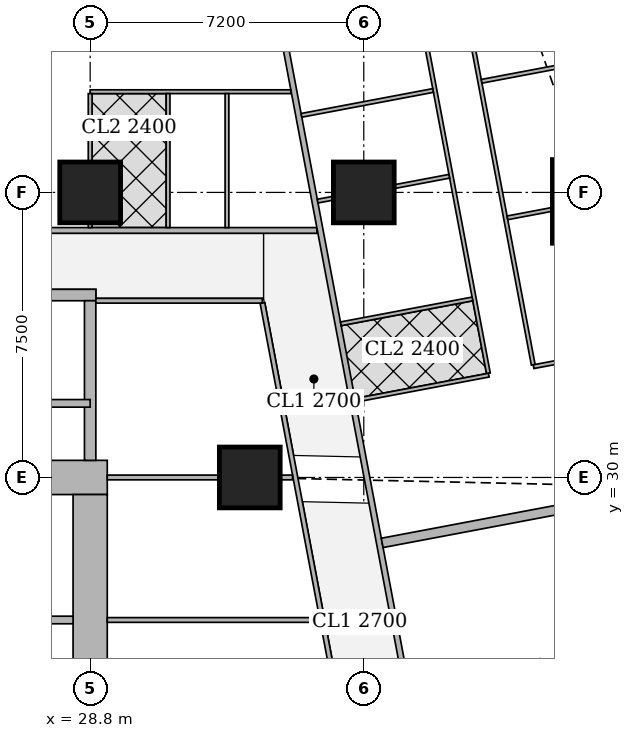
"""IFC4 building model, lengths in metres.
Left out: names, types, materials, properties, quantities, classifications, styles, units other than length and angle.
Written with IfcOpenShell. Run it as: python <this file> out.ifc"""

import sys

from ifc_helpers import new_model, si_unit, direction, frame, frame_2d, origin, origin_2d, place, context, subcontext, project, spatial, rectangle, extrude, element, fill, save


model = new_model("IFC4")
c1 = context("Model", 3, precision=1e-05, world=origin(), true_north=direction((0.0, 1.0)))
c2 = subcontext(c1, "Body", "Model", "MODEL_VIEW")
j1 = project(units=[si_unit("LENGTHUNIT", "METRE"), si_unit("PLANEANGLEUNIT", "RADIAN")], contexts=[c1])
p1 = place(None, origin())
s1 = spatial("IfcSite", under=j1, at=p1, CompositionType="ELEMENT")
p2 = place(p1, origin())
s2 = spatial("IfcBuilding", under=s1, at=p2, CompositionType="ELEMENT")
p3 = place(p2, frame((0.0, 0.0, 89.15)))
s3 = spatial("IfcBuildingStorey", under=s2, at=p3, CompositionType="ELEMENT", Elevation=89.15)
for number, where, z_axis, x_axis in (
    (1, (33.0, 30.0, 0.0), (0.0, 0.0, 1.0), (1.0, 0.0, 0.0)),
    (2, (28.8, 37.5, 0.0), (0.0, 0.0, 1.0), (1.0, 0.0, 0.0)),
    (3, (36.0, 37.5, 0.0), (0.0, 0.0, 1.0), (1.0, 0.0, 0.0)),
):
    element("IfcColumn", number, at=place(p3, frame(where, z_axis=z_axis, x_axis=x_axis)), inside=s3, PredefinedType="COLUMN", context=c2, shape_type="SweptSolid", body=[
        extrude(rectangle(XDim=1.6, YDim=1.6, at=origin_2d()), origin(), (0.0, 0.0, 1.0), 3.75),
    ])
p4 = place(p3, frame((42.064, 37.263, 0.0), z_axis=(0.0, 0.0, 1.0), x_axis=(1.0, 0.0, 0.0)))
e4 = element("IfcColumn", 4, at=p4, inside=s3, PredefinedType="COLUMN", context=c2, shape_type="SweptSolid", body=[
    extrude(rectangle(XDim=2.2, YDim=2.2, at=origin_2d()), origin(), (0.0, 0.0, 1.0), 3.75),
])
p5 = place(p3, frame((13.95, 30.0, 0.0), z_axis=(0.0, 0.0, 1.0), x_axis=(1.0, 0.0, 0.0)))
e5 = element("IfcWall", 5, at=p5, inside=s3, PredefinedType="SHEAR", context=c2, shape_type="SweptSolid", body=[
    extrude(rectangle(XDim=15.3, YDim=0.9, at=frame_2d((7.65, 0.0))), origin(), (0.0, 0.0, 1.0), 3.75),
])
p6 = place(p5, frame((4.45, 0.0, 0.0)))
e6 = element("IfcOpeningElement", 6, at=p6, cuts=e5, PredefinedType="OPENING", context=c2, shape_type="SweptSolid", body=[
    extrude(rectangle(XDim=1.8, YDim=2.1, at=frame_2d((0.9, 1.05))), frame((0.0, 0.46, 0.0), z_axis=(0.0, -1.0, 0.0), x_axis=(1.0, 0.0, 0.0)), (0.0, 0.0, 1.0), 0.92),
])
p7 = place(p5, frame((10.7, 0.0, 0.0)))
e7 = element("IfcOpeningElement", 7, at=p7, cuts=e5, PredefinedType="OPENING", context=c2, shape_type="SweptSolid", body=[
    extrude(rectangle(XDim=1.1, YDim=2.1, at=frame_2d((0.55, 1.05))), frame((0.0, 0.46, 0.0), z_axis=(0.0, -1.0, 0.0), x_axis=(1.0, 0.0, 0.0)), (0.0, 0.0, 1.0), 0.92),
])
p8 = place(p3, frame((28.8, 15.45, 0.0), z_axis=(0.0, 0.0, 1.0), x_axis=(0.0, 1.0, 0.0)))
e8 = element("IfcWall", 8, at=p8, inside=s3, PredefinedType="SHEAR", context=c2, shape_type="SweptSolid", body=[
    extrude(rectangle(XDim=14.1, YDim=0.9, at=frame_2d((7.05, 0.0))), origin(), (0.0, 0.0, 1.0), 3.75),
])
p9 = place(p3, frame((21.45, 34.8, 0.0), z_axis=(0.0, 0.0, 1.0), x_axis=(1.0, 0.0, 0.0)))
e9 = element("IfcWall", 9, at=p9, inside=s3, PredefinedType="SHEAR", context=c2, shape_type="SweptSolid", body=[
    extrude(rectangle(XDim=7.5, YDim=0.3, at=frame_2d((3.75, 0.0))), origin(), (0.0, 0.0, 1.0), 3.75),
])
p10 = place(p9, frame((0.5, 0.0, 0.0)))
e10 = element("IfcOpeningElement", 10, at=p10, cuts=e9, PredefinedType="OPENING", context=c2, shape_type="SweptSolid", body=[
    extrude(rectangle(XDim=1.1, YDim=2.1, at=frame_2d((0.55, 1.05))), frame((0.0, 0.16, 0.0), z_axis=(0.0, -1.0, 0.0), x_axis=(1.0, 0.0, 0.0)), (0.0, 0.0, 1.0), 0.32),
])
p11 = place(p3, frame((28.8, 30.45, 0.0), z_axis=(0.0, 0.0, 1.0), x_axis=(0.0, 1.0, 0.0)))
e11 = element("IfcWall", 11, at=p11, inside=s3, PredefinedType="SHEAR", context=c2, shape_type="SweptSolid", body=[
    extrude(rectangle(XDim=4.2, YDim=0.3, at=frame_2d((2.1, 0.0))), origin(), (0.0, 0.0, 1.0), 3.75),
])
p12 = place(p3, frame((8.35, 36.5, 0.0), z_axis=(0.0, 0.0, 1.0), x_axis=(1.0, 0.0, 0.0)))
e12 = element("IfcWall", 12, at=p12, inside=s3, PredefinedType="SOLIDWALL", context=c2, shape_type="SweptSolid", body=[
    extrude(rectangle(XDim=26.415, YDim=0.15, at=frame_2d((13.208, 0.0))), origin(), (0.0, 0.0, 1.0), 3.5),
])
p13 = place(p12, frame((2.6, 0.0, 0.0)))
e13 = element("IfcOpeningElement", 13, at=p13, cuts=e12, PredefinedType="OPENING", context=c2, shape_type="SweptSolid", body=[
    extrude(rectangle(XDim=1.0, YDim=2.1, at=frame_2d((0.5, 1.05))), frame((0.0, 0.085, 0.0), z_axis=(0.0, -1.0, 0.0), x_axis=(1.0, 0.0, 0.0)), (0.0, 0.0, 1.0), 0.17),
])
p14 = place(p12, frame((10.75, 0.0, 0.0)))
e14 = element("IfcOpeningElement", 14, at=p14, cuts=e12, PredefinedType="OPENING", context=c2, shape_type="SweptSolid", body=[
    extrude(rectangle(XDim=1.0, YDim=2.1, at=frame_2d((0.5, 1.05))), frame((0.0, 0.085, 0.0), z_axis=(0.0, -1.0, 0.0), x_axis=(1.0, 0.0, 0.0)), (0.0, 0.0, 1.0), 0.17),
])
p15 = place(p12, frame((18.007, 0.0, 0.0)))
e15 = element("IfcOpeningElement", 15, at=p15, cuts=e12, PredefinedType="OPENING", context=c2, shape_type="SweptSolid", body=[
    extrude(rectangle(XDim=1.0, YDim=2.1, at=frame_2d((0.5, 1.05))), frame((0.0, 0.085, 0.0), z_axis=(0.0, -1.0, 0.0), x_axis=(1.0, 0.0, 0.0)), (0.0, 0.0, 1.0), 0.17),
])
p16 = place(p3, frame((33.127, 45.65, 0.0), z_axis=(0.0, 0.0, 1.0), x_axis=(0.185598547723, -0.98262565562, 0.0)))
e16 = element("IfcWall", 16, at=p16, inside=s3, PredefinedType="SOLIDWALL", context=c2, shape_type="SweptSolid", body=[
    extrude(rectangle(XDim=47.118, YDim=0.15, at=frame_2d((23.559, 0.0))), origin(), (0.0, 0.0, 1.0), 2.2),
])
p17 = place(p16, frame((15.285, 0.0, 0.0)))
e17 = element("IfcOpeningElement", 17, at=p17, cuts=e16, PredefinedType="OPENING", context=c2, shape_type="SweptSolid", body=[
    extrude(rectangle(XDim=1.0, YDim=2.1, at=frame_2d((0.5, 1.05))), frame((0.0, 0.085, 0.0), z_axis=(0.0, -1.0, 0.0), x_axis=(1.0, 0.0, 0.0)), (0.0, 0.0, 1.0), 0.17),
])
p18 = place(p16, frame((19.102, 0.0, 0.0)))
e18 = element("IfcOpeningElement", 18, at=p18, cuts=e16, PredefinedType="OPENING", context=c2, shape_type="SweptSolid", body=[
    extrude(rectangle(XDim=1.0, YDim=2.1, at=frame_2d((0.5, 1.05))), frame((0.0, 0.085, 0.0), z_axis=(0.0, -1.0, 0.0), x_axis=(1.0, 0.0, 0.0)), (0.0, 0.0, 1.0), 0.17),
])
p19 = place(p16, frame((33.88, 0.0, 0.0)))
e19 = element("IfcOpeningElement", 19, at=p19, cuts=e16, PredefinedType="OPENING", context=c2, shape_type="SweptSolid", body=[
    extrude(rectangle(XDim=1.0, YDim=2.1, at=frame_2d((0.5, 1.05))), frame((0.0, 0.085, 0.0), z_axis=(0.0, -1.0, 0.0), x_axis=(1.0, 0.0, 0.0)), (0.0, 0.0, 1.0), 0.17),
])
p20 = place(p3, frame((38.862, 41.42, 0.0), z_axis=(0.0, 0.0, 1.0), x_axis=(0.185574815416, -0.982630137887, 0.0)))
e20 = element("IfcWall", 20, at=p20, inside=s3, PredefinedType="PARTITIONING", context=c2, shape_type="SweptSolid", body=[
    extrude(rectangle(XDim=8.605, YDim=0.1, at=frame_2d((4.303, 0.0))), origin(), (0.0, 0.0, 1.0), 3.5),
])
p21 = place(p20, frame((7.555, 0.0, 0.0)))
e21 = element("IfcOpeningElement", 21, at=p21, cuts=e20, PredefinedType="OPENING", context=c2, shape_type="SweptSolid", body=[
    extrude(rectangle(XDim=0.9, YDim=2.1, at=frame_2d((0.45, 1.05))), frame((0.0, 0.06, 0.0), z_axis=(0.0, -1.0, 0.0), x_axis=(1.0, 0.0, 0.0)), (0.0, 0.0, 1.0), 0.12),
])
p22 = place(p20, frame((3.579, 0.0, 0.0)))
e22 = element("IfcOpeningElement", 22, at=p22, cuts=e20, PredefinedType="OPENING", context=c2, shape_type="SweptSolid", body=[
    extrude(rectangle(XDim=0.9, YDim=2.1, at=frame_2d((0.45, 1.05))), frame((0.0, 0.06, 0.0), z_axis=(0.0, -1.0, 0.0), x_axis=(1.0, 0.0, 0.0)), (0.0, 0.0, 1.0), 0.12),
])
p23 = place(p3, frame((37.473, 42.309, 0.0), z_axis=(0.0, 0.0, 1.0), x_axis=(0.185491912953, -0.982645790827, 0.0)))
e23 = element("IfcWall", 23, at=p23, inside=s3, PredefinedType="PARTITIONING", context=c2, shape_type="SweptSolid", body=[
    extrude(rectangle(XDim=9.737, YDim=0.1, at=frame_2d((4.869, 0.0))), origin(), (0.0, 0.0, 1.0), 3.5),
])
p24 = place(p23, frame((8.312, 0.0, 0.0)))
e24 = element("IfcOpeningElement", 24, at=p24, cuts=e23, PredefinedType="OPENING", context=c2, shape_type="SweptSolid", body=[
    extrude(rectangle(XDim=0.9, YDim=2.1, at=frame_2d((0.45, 1.05))), frame((0.0, 0.06, 0.0), z_axis=(0.0, -1.0, 0.0), x_axis=(1.0, 0.0, 0.0)), (0.0, 0.0, 1.0), 0.12),
])
p25 = place(p23, frame((2.853, 0.0, 0.0)))
e25 = element("IfcOpeningElement", 25, at=p25, cuts=e23, PredefinedType="OPENING", context=c2, shape_type="SweptSolid", body=[
    extrude(rectangle(XDim=0.9, YDim=2.1, at=frame_2d((0.45, 1.05))), frame((0.0, 0.06, 0.0), z_axis=(0.0, -1.0, 0.0), x_axis=(1.0, 0.0, 0.0)), (0.0, 0.0, 1.0), 0.12),
])
p26 = place(p23, frame((5.644, 0.0, 0.0)))
e26 = element("IfcOpeningElement", 26, at=p26, cuts=e23, PredefinedType="OPENING", context=c2, shape_type="SweptSolid", body=[
    extrude(rectangle(XDim=0.9, YDim=2.1, at=frame_2d((0.45, 1.05))), frame((0.0, 0.06, 0.0), z_axis=(0.0, -1.0, 0.0), x_axis=(1.0, 0.0, 0.0)), (0.0, 0.0, 1.0), 0.12),
])
p27 = place(p3, frame((43.277, 41.212, 0.0), z_axis=(0.0, 0.0, 1.0), x_axis=(-0.982665405803, -0.185387972203, 0.0)))
e27 = element("IfcWall", 27, at=p27, inside=s3, PredefinedType="PARTITIONING", context=c2, shape_type="SweptSolid", body=[
    extrude(rectangle(XDim=4.25, YDim=0.1, at=frame_2d((2.125, 0.0))), origin(), (0.0, 0.0, 1.0), 2.05),
])
p28 = place(p3, frame((40.954, 37.053, 0.0), z_axis=(0.0, 0.0, 1.0), x_axis=(-0.982628652346, -0.185582681276, 0.0)))
e28 = element("IfcWall", 28, at=p28, inside=s3, PredefinedType="PARTITIONING", context=c2, shape_type="SweptSolid", body=[
    extrude(rectangle(XDim=1.196, YDim=0.1, at=frame_2d((0.598, 0.0))), origin(), (0.0, 0.0, 1.0), 2.05),
])
p29 = place(p3, frame((44.693, 33.713, 0.0), z_axis=(0.0, 0.0, 1.0), x_axis=(-0.982633535512, -0.185556823879, 0.0)))
e29 = element("IfcWall", 29, at=p29, inside=s3, PredefinedType="PARTITIONING", context=c2, shape_type="SweptSolid", body=[
    extrude(rectangle(XDim=4.3, YDim=0.1, at=frame_2d((2.15, 0.0))), origin(), (0.0, 0.0, 1.0), 2.2),
])
p30 = place(p3, frame((37.823, 40.182, 0.0), z_axis=(0.0, 0.0, 1.0), x_axis=(-0.98263926043, -0.185526504472, 0.0)))
e30 = element("IfcWall", 30, at=p30, inside=s3, PredefinedType="PARTITIONING", context=c2, shape_type="SweptSolid", body=[
    extrude(rectangle(XDim=3.524, YDim=0.1, at=frame_2d((1.762, 0.0))), origin(), (0.0, 0.0, 1.0), 3.5),
])
p31 = place(p3, frame((38.25, 37.925, 0.0), z_axis=(0.0, 0.0, 1.0), x_axis=(-0.982626127294, -0.185596050493, 0.0)))
e31 = element("IfcWall", 31, at=p31, inside=s3, PredefinedType="PARTITIONING", context=c2, shape_type="SweptSolid", body=[
    extrude(rectangle(XDim=1.465, YDim=0.1, at=frame_2d((0.733, 0.0))), origin(), (0.0, 0.0, 1.0), 3.5),
])
p32 = place(p3, frame((35.19, 37.347, 0.0), z_axis=(0.0, 0.0, 1.0), x_axis=(-0.982798158448, -0.184682916784, 0.0)))
e32 = element("IfcWall", 32, at=p32, inside=s3, PredefinedType="PARTITIONING", context=c2, shape_type="SweptSolid", body=[
    extrude(rectangle(XDim=0.411, YDim=0.1, at=frame_2d((0.206, 0.0))), origin(), (0.0, 0.0, 1.0), 3.5),
])
p33 = place(p3, frame((39.289, 32.692, 0.0), z_axis=(0.0, 0.0, 1.0), x_axis=(-0.982662827464, -0.185401638399, 0.0)))
e33 = element("IfcWall", 33, at=p33, inside=s3, PredefinedType="PARTITIONING", context=c2, shape_type="SweptSolid", body=[
    extrude(rectangle(XDim=3.575, YDim=0.1, at=frame_2d((1.788, 0.0))), origin(), (0.0, 0.0, 1.0), 3.5),
])
p34 = place(p3, frame((38.859, 34.697, 0.0), z_axis=(0.0, 0.0, 1.0), x_axis=(-0.982626628545, -0.185593396635, 0.0)))
e34 = element("IfcWall", 34, at=p34, inside=s3, PredefinedType="PARTITIONING", context=c2, shape_type="SweptSolid", body=[
    extrude(rectangle(XDim=3.524, YDim=0.1, at=frame_2d((1.762, 0.0))), origin(), (0.0, 0.0, 1.0), 3.5),
])
p35 = place(p3, frame((41.177, 29.164, 0.0), z_axis=(0.0, 0.0, 1.0), x_axis=(-0.982642846239, -0.185507511263, 0.0)))
e35 = element("IfcWall", 35, at=p35, inside=s3, PredefinedType="SOLIDWALL", context=c2, shape_type="SweptSolid", body=[
    extrude(rectangle(XDim=4.776, YDim=0.25, at=frame_2d((2.388, 0.0))), origin(), (0.0, 0.0, 1.0), 2.5),
])
p36 = place(p3, frame((28.8, 40.15, 0.0), z_axis=(0.0, 0.0, 1.0), x_axis=(1.0, 0.0, 0.0)))
e36 = element("IfcWall", 36, at=p36, inside=s3, PredefinedType="PARTITIONING", context=c2, shape_type="SweptSolid", body=[
    extrude(rectangle(XDim=5.28, YDim=0.1, at=frame_2d((2.64, 0.0))), origin(), (0.0, 0.0, 1.0), 3.5),
])
p37 = place(p36, frame((0.575, 0.0, 0.0)))
e37 = element("IfcOpeningElement", 37, at=p37, cuts=e36, PredefinedType="OPENING", context=c2, shape_type="SweptSolid", body=[
    extrude(rectangle(XDim=0.9, YDim=2.1, at=frame_2d((0.45, 1.05))), frame((0.0, 0.06, 0.0), z_axis=(0.0, -1.0, 0.0), x_axis=(1.0, 0.0, 0.0)), (0.0, 0.0, 1.0), 0.12),
])
p38 = place(p36, frame((4.23, 0.0, 0.0)))
e38 = element("IfcOpeningElement", 38, at=p38, cuts=e36, PredefinedType="OPENING", context=c2, shape_type="SweptSolid", body=[
    extrude(rectangle(XDim=0.9, YDim=2.1, at=frame_2d((0.45, 1.05))), frame((0.0, 0.06, 0.0), z_axis=(0.0, -1.0, 0.0), x_axis=(1.0, 0.0, 0.0)), (0.0, 0.0, 1.0), 0.12),
])
p39 = place(p36, frame((2.375, 0.0, 0.0)))
e39 = element("IfcOpeningElement", 39, at=p39, cuts=e36, PredefinedType="OPENING", context=c2, shape_type="SweptSolid", body=[
    extrude(rectangle(XDim=0.9, YDim=2.1, at=frame_2d((0.45, 1.05))), frame((0.0, 0.06, 0.0), z_axis=(0.0, -1.0, 0.0), x_axis=(1.0, 0.0, 0.0)), (0.0, 0.0, 1.0), 0.12),
])
p40 = place(p3, frame((28.8, 36.575, 0.0), z_axis=(0.0, 0.0, 1.0), x_axis=(0.0, 1.0, 0.0)))
e40 = element("IfcWall", 40, at=p40, inside=s3, PredefinedType="PARTITIONING", context=c2, shape_type="SweptSolid", body=[
    extrude(rectangle(XDim=0.124, YDim=0.1, at=frame_2d((0.062, 0.0))), origin(), (0.0, 0.0, 1.0), 3.5),
])
p41 = place(p3, frame((28.8, 38.301, 0.0), z_axis=(0.0, 0.0, 1.0), x_axis=(0.0, 1.0, 0.0)))
e41 = element("IfcWall", 41, at=p41, inside=s3, PredefinedType="PARTITIONING", context=c2, shape_type="SweptSolid", body=[
    extrude(rectangle(XDim=1.799, YDim=0.1, at=frame_2d((0.899, 0.0))), origin(), (0.0, 0.0, 1.0), 3.5),
])
for number, where, z_axis, x_axis in (
    (42, (32.4, 36.575, 0.0), (0.0, 0.0, 1.0), (0.0, 1.0, 0.0)),
    (43, (30.85, 36.575, 0.0), (0.0, 0.0, 1.0), (0.0, 1.0, 0.0)),
):
    element("IfcWall", number, at=place(p3, frame(where, z_axis=z_axis, x_axis=x_axis)), inside=s3, PredefinedType="PARTITIONING", context=c2, shape_type="SweptSolid", body=[
        extrude(rectangle(XDim=3.525, YDim=0.1, at=frame_2d((1.763, 0.0))), origin(), (0.0, 0.0, 1.0), 3.5),
    ])
p42 = place(p3, frame((28.95, 34.65, 0.0), z_axis=(0.0, 0.0, 1.0), x_axis=(1.0, 0.0, 0.0)))
e44 = element("IfcWall", 44, at=p42, inside=s3, PredefinedType="PARTITIONING", context=c2, shape_type="SweptSolid", body=[
    extrude(rectangle(XDim=4.381, YDim=0.125, at=frame_2d((2.19, 0.0))), origin(), (0.0, 0.0, 1.0), 3.5),
])
p43 = place(p3, frame((37.9, 10.413, 0.0), z_axis=(0.0, 0.0, 1.0), x_axis=(-0.185589740669, 0.982627319058, 0.0)))
e45 = element("IfcWall", 45, at=p43, inside=s3, PredefinedType="PARTITIONING", context=c2, shape_type="SweptSolid", body=[
    extrude(rectangle(XDim=24.602, YDim=0.125, at=frame_2d((12.301, 0.0))), origin(), (0.0, 0.0, 1.0), 2.5),
])
p44 = place(p43, frame((0.708, 0.0, 0.0)))
e46 = element("IfcOpeningElement", 46, at=p44, cuts=e45, PredefinedType="OPENING", context=c2, shape_type="SweptSolid", body=[
    extrude(rectangle(XDim=1.0, YDim=2.1, at=frame_2d((0.5, 1.05))), frame((0.0, 0.073, 0.0), z_axis=(0.0, -1.0, 0.0), x_axis=(1.0, 0.0, 0.0)), (0.0, 0.0, 1.0), 0.145),
])
p45 = place(p43, frame((5.75, 0.0, 0.0)))
e47 = element("IfcOpeningElement", 47, at=p45, cuts=e45, PredefinedType="OPENING", context=c2, shape_type="SweptSolid", body=[
    extrude(rectangle(XDim=1.0, YDim=2.1, at=frame_2d((0.5, 1.05))), frame((0.0, 0.073, 0.0), z_axis=(0.0, -1.0, 0.0), x_axis=(1.0, 0.0, 0.0)), (0.0, 0.0, 1.0), 0.145),
])
p46 = place(p43, frame((13.124, 0.0, 0.0)))
e48 = element("IfcOpeningElement", 48, at=p46, cuts=e45, PredefinedType="OPENING", context=c2, shape_type="SweptSolid", body=[
    extrude(rectangle(XDim=1.0, YDim=2.1, at=frame_2d((0.5, 1.05))), frame((0.0, 0.073, 0.0), z_axis=(0.0, -1.0, 0.0), x_axis=(1.0, 0.0, 0.0)), (0.0, 0.0, 1.0), 0.145),
])
p47 = place(p43, frame((16.94, 0.0, 0.0)))
e49 = element("IfcOpeningElement", 49, at=p47, cuts=e45, PredefinedType="OPENING", context=c2, shape_type="SweptSolid", body=[
    extrude(rectangle(XDim=1.0, YDim=2.1, at=frame_2d((0.5, 1.05))), frame((0.0, 0.073, 0.0), z_axis=(0.0, -1.0, 0.0), x_axis=(1.0, 0.0, 0.0)), (0.0, 0.0, 1.0), 0.145),
])
p48 = place(p43, frame((21.0, 0.0, 0.0)))
e50 = element("IfcOpeningElement", 50, at=p48, cuts=e45, PredefinedType="OPENING", context=c2, shape_type="SweptSolid", body=[
    extrude(rectangle(XDim=1.0, YDim=2.1, at=frame_2d((0.5, 1.05))), frame((0.0, 0.073, 0.0), z_axis=(0.0, -1.0, 0.0), x_axis=(1.0, 0.0, 0.0)), (0.0, 0.0, 1.0), 0.145),
])
p49 = place(p3, frame((29.25, 26.25, 0.0), z_axis=(0.0, 0.0, 1.0), x_axis=(1.0, 0.0, 0.0)))
e51 = element("IfcWall", 51, at=p49, inside=s3, PredefinedType="PARTITIONING", context=c2, shape_type="SweptSolid", body=[
    extrude(rectangle(XDim=5.583, YDim=0.125, at=frame_2d((2.792, 0.0))), origin(), (0.0, 0.0, 1.0), 3.5),
])
p50 = place(p3, frame((29.25, 30.0, 0.0), z_axis=(0.0, 0.0, 1.0), x_axis=(1.0, 0.0, 0.0)))
e52 = element("IfcWall", 52, at=p50, inside=s3, PredefinedType="PARTITIONING", context=c2, shape_type="SweptSolid", body=[
    extrude(rectangle(XDim=2.949, YDim=0.125, at=frame_2d((1.475, 0.0))), origin(), (0.0, 0.0, 1.0), 3.5),
])
p51 = place(p3, frame((33.801, 30.0, 0.0), z_axis=(0.0, 0.0, 1.0), x_axis=(1.0, 0.0, 0.0)))
e53 = element("IfcWall", 53, at=p51, inside=s3, PredefinedType="PARTITIONING", context=c2, shape_type="SweptSolid", body=[
    extrude(rectangle(XDim=0.324, YDim=0.125, at=frame_2d((0.162, 0.0))), origin(), (0.0, 0.0, 1.0), 2.5),
])
p52 = place(p3, frame((23.0, 31.95, 0.0), z_axis=(0.0, 0.0, 1.0), x_axis=(1.0, 0.0, 0.0)))
e54 = element("IfcWall", 54, at=p52, inside=s3, PredefinedType="SHEAR", context=c2, shape_type="SweptSolid", body=[
    extrude(rectangle(XDim=5.8, YDim=0.2, at=frame_2d((2.9, 0.0))), origin(), (0.0, 0.0, 1.0), 3.75),
])
p53 = place(p3, frame((27.4, 26.25, 0.0), z_axis=(0.0, 0.0, 1.0), x_axis=(1.0, 0.0, 0.0)))
e55 = element("IfcWall", 55, at=p53, inside=s3, PredefinedType="SOLIDWALL", context=c2, shape_type="SweptSolid", body=[
    extrude(rectangle(XDim=0.95, YDim=0.2, at=frame_2d((0.475, 0.0))), origin(), (0.0, 0.0, 1.0), 3.5),
])
p54 = place(p21, origin())
e56 = element("IfcDoor", 56, at=p54, inside=s3, OperationType="SINGLE_SWING_RIGHT", PredefinedType="DOOR", context=c2, shape_type="SweptSolid", body=[
    extrude(rectangle(XDim=0.9, YDim=2.1, at=frame_2d((0.45, 1.05))), frame((0.0, 0.025, 0.0), z_axis=(0.0, -1.0, 0.0), x_axis=(1.0, 0.0, 0.0)), (0.0, 0.0, 1.0), 0.05),
])
fill(e21, e56)
p55 = place(p22, origin())
e57 = element("IfcDoor", 57, at=p55, inside=s3, OperationType="SINGLE_SWING_RIGHT", PredefinedType="DOOR", context=c2, shape_type="SweptSolid", body=[
    extrude(rectangle(XDim=0.9, YDim=2.1, at=frame_2d((0.45, 1.05))), frame((0.0, 0.025, 0.0), z_axis=(0.0, -1.0, 0.0), x_axis=(1.0, 0.0, 0.0)), (0.0, 0.0, 1.0), 0.05),
])
fill(e22, e57)
p56 = place(p24, origin())
e58 = element("IfcDoor", 58, at=p56, inside=s3, OperationType="SINGLE_SWING_LEFT", PredefinedType="DOOR", context=c2, shape_type="SweptSolid", body=[
    extrude(rectangle(XDim=0.9, YDim=2.1, at=frame_2d((0.45, 1.05))), frame((0.0, 0.025, 0.0), z_axis=(0.0, -1.0, 0.0), x_axis=(1.0, 0.0, 0.0)), (0.0, 0.0, 1.0), 0.05),
])
fill(e24, e58)
p57 = place(p25, origin())
e59 = element("IfcDoor", 59, at=p57, inside=s3, OperationType="SINGLE_SWING_RIGHT", PredefinedType="DOOR", context=c2, shape_type="SweptSolid", body=[
    extrude(rectangle(XDim=0.9, YDim=2.1, at=frame_2d((0.45, 1.05))), frame((0.0, 0.025, 0.0), z_axis=(0.0, -1.0, 0.0), x_axis=(1.0, 0.0, 0.0)), (0.0, 0.0, 1.0), 0.05),
])
fill(e25, e59)
p58 = place(p26, origin())
e60 = element("IfcDoor", 60, at=p58, inside=s3, OperationType="SINGLE_SWING_RIGHT", PredefinedType="DOOR", context=c2, shape_type="SweptSolid", body=[
    extrude(rectangle(XDim=0.9, YDim=2.1, at=frame_2d((0.45, 1.05))), frame((0.0, 0.025, 0.0), z_axis=(0.0, -1.0, 0.0), x_axis=(1.0, 0.0, 0.0)), (0.0, 0.0, 1.0), 0.05),
])
fill(e26, e60)
p59 = place(p17, origin())
e61 = element("IfcDoor", 61, at=p59, inside=s3, OperationType="SINGLE_SWING_LEFT", PredefinedType="DOOR", context=c2, shape_type="SweptSolid", body=[
    extrude(rectangle(XDim=1.0, YDim=2.1, at=frame_2d((0.5, 1.05))), frame((0.0, 0.025, 0.0), z_axis=(0.0, -1.0, 0.0), x_axis=(1.0, 0.0, 0.0)), (0.0, 0.0, 1.0), 0.05),
])
fill(e17, e61)
p60 = place(p18, origin())
e62 = element("IfcDoor", 62, at=p60, inside=s3, OperationType="SINGLE_SWING_LEFT", PredefinedType="DOOR", context=c2, shape_type="SweptSolid", body=[
    extrude(rectangle(XDim=1.0, YDim=2.1, at=frame_2d((0.5, 1.05))), frame((0.0, 0.025, 0.0), z_axis=(0.0, -1.0, 0.0), x_axis=(1.0, 0.0, 0.0)), (0.0, 0.0, 1.0), 0.05),
])
fill(e18, e62)
p61 = place(p37, origin())
e63 = element("IfcDoor", 63, at=p61, inside=s3, OperationType="SINGLE_SWING_RIGHT", PredefinedType="DOOR", context=c2, shape_type="SweptSolid", body=[
    extrude(rectangle(XDim=0.9, YDim=2.1, at=frame_2d((0.45, 1.05))), frame((0.0, 0.025, 0.0), z_axis=(0.0, -1.0, 0.0), x_axis=(1.0, 0.0, 0.0)), (0.0, 0.0, 1.0), 0.05),
])
fill(e37, e63)
p62 = place(p38, origin())
e64 = element("IfcDoor", 64, at=p62, inside=s3, OperationType="SINGLE_SWING_LEFT", PredefinedType="DOOR", context=c2, shape_type="SweptSolid", body=[
    extrude(rectangle(XDim=0.9, YDim=2.1, at=frame_2d((0.45, 1.05))), frame((0.0, 0.025, 0.0), z_axis=(0.0, -1.0, 0.0), x_axis=(1.0, 0.0, 0.0)), (0.0, 0.0, 1.0), 0.05),
])
fill(e38, e64)
p63 = place(p39, origin())
e65 = element("IfcDoor", 65, at=p63, inside=s3, OperationType="SINGLE_SWING_LEFT", PredefinedType="DOOR", context=c2, shape_type="SweptSolid", body=[
    extrude(rectangle(XDim=0.9, YDim=2.1, at=frame_2d((0.45, 1.05))), frame((0.0, 0.025, 0.0), z_axis=(0.0, -1.0, 0.0), x_axis=(1.0, 0.0, 0.0)), (0.0, 0.0, 1.0), 0.05),
])
fill(e39, e65)
p64 = place(p47, origin())
e66 = element("IfcDoor", 66, at=p64, inside=s3, OperationType="SINGLE_SWING_LEFT", PredefinedType="DOOR", context=c2, shape_type="SweptSolid", body=[
    extrude(rectangle(XDim=1.0, YDim=2.1, at=frame_2d((0.5, 1.05))), frame((0.0, 0.025, 0.0), z_axis=(0.0, -1.0, 0.0), x_axis=(1.0, 0.0, 0.0)), (0.0, 0.0, 1.0), 0.05),
])
fill(e49, e66)
p65 = place(p48, origin())
e67 = element("IfcDoor", 67, at=p65, inside=s3, OperationType="SINGLE_SWING_LEFT", PredefinedType="DOOR", context=c2, shape_type="SweptSolid", body=[
    extrude(rectangle(XDim=1.0, YDim=2.1, at=frame_2d((0.5, 1.05))), frame((0.0, 0.025, 0.0), z_axis=(0.0, -1.0, 0.0), x_axis=(1.0, 0.0, 0.0)), (0.0, 0.0, 1.0), 0.05),
])
fill(e50, e67)
save(model, sys.argv[1])
